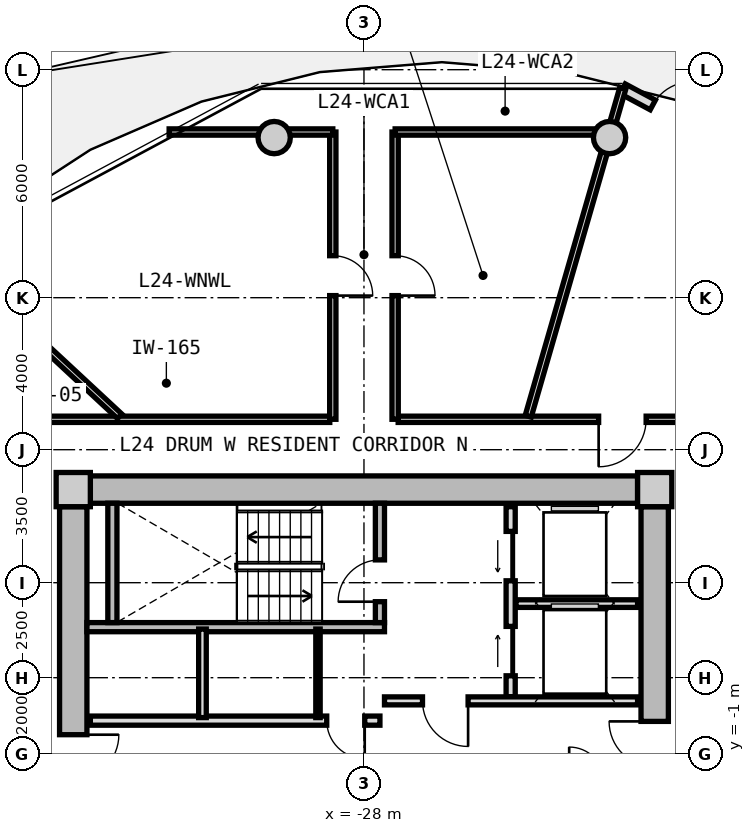
"""IFC4 building model, lengths in metres.
Left out: names, types, materials, properties, quantities, classifications, styles, units other than length and angle.
Written with IfcOpenShell. Run it as: python <this file> out.ifc"""

import sys

from ifc_helpers import new_model, si_unit, direction, frame, frame_2d, origin, origin_2d, place, context, subcontext, project, spatial, rectangle, circle, extrude, source, transform, mapped, element, fill, save


model = new_model("IFC4")
c1 = context("Model", 3, precision=1e-05, world=origin(), true_north=direction((0.0, 1.0)))
c2 = subcontext(c1, "Body", "Model", "MODEL_VIEW")
j1 = project(units=[si_unit("LENGTHUNIT", "METRE"), si_unit("PLANEANGLEUNIT", "RADIAN")], contexts=[c1])
p1 = place(None, origin())
s1 = spatial("IfcSite", under=j1, at=p1, CompositionType="ELEMENT")
p2 = place(p1, origin())
s2 = spatial("IfcBuilding", under=s1, at=p2, CompositionType="ELEMENT")
p3 = place(p2, frame((0.0, 0.0, 81.0)))
s3 = spatial("IfcBuildingStorey", under=s2, at=p3, CompositionType="ELEMENT", Elevation=81.0)
m1 = source(origin(), c2, "Body", "SweptSolid", [
    extrude(rectangle(XDim=0.9, YDim=0.9, at=origin_2d()), origin(), (0.0, 0.0, 1.0), 3.05),
])
for number, where, z_axis, x_axis in (
    (1, (-20.35, 5.95, 0.0), (0.0, 0.0, 1.0), (1.0, 0.0, 0.0)),
    (2, (-35.65, 5.95, 0.0), (0.0, 0.0, 1.0), (1.0, 0.0, 0.0)),
):
    element("IfcColumn", number, at=place(p3, frame(where, z_axis=z_axis, x_axis=x_axis)), inside=s3, PredefinedType="COLUMN", context=c2, shape_type="MappedRepresentation", body=[
        mapped(m1, transform((0.0, 0.0, 0.0), x_axis=(1.0, 0.0, 0.0), y_axis=(0.0, 1.0, 0.0), z_axis=(0.0, 0.0, 1.0), scale=1.0)),
    ])
m2 = source(origin(), c2, "Body", "SweptSolid", [
    extrude(rectangle(XDim=14.4, YDim=0.72, at=frame_2d((7.2, 0.0))), origin(), (0.0, 0.0, 1.0), 2.79),
])
p4 = place(p3, frame((-35.2, 5.95, 0.0), z_axis=(0.0, 0.0, 1.0), x_axis=(1.0, 0.0, 0.0)))
e3 = element("IfcWall", 3, at=p4, inside=s3, PredefinedType="SHEAR", context=c2, shape_type="MappedRepresentation", body=[
    mapped(m2, transform((0.0, 0.0, 0.0), x_axis=(1.0, 0.0, 0.0), y_axis=(0.0, 1.0, 0.0), z_axis=(0.0, 0.0, 1.0), scale=1.0)),
])
m3 = source(origin(), c2, "Body", "SweptSolid", [
    extrude(rectangle(XDim=11.0, YDim=0.72, at=frame_2d((5.5, 0.0))), origin(), (0.0, 0.0, 1.0), 2.79),
])
p5 = place(p3, frame((-35.65, -5.5, 0.0), z_axis=(0.0, 0.0, 1.0), x_axis=(0.0, 1.0, 0.0)))
e4 = element("IfcWall", 4, at=p5, inside=s3, PredefinedType="SHEAR", context=c2, shape_type="MappedRepresentation", body=[
    mapped(m3, transform((0.0, 0.0, 0.0), x_axis=(1.0, 0.0, 0.0), y_axis=(0.0, 1.0, 0.0), z_axis=(0.0, 0.0, 1.0), scale=1.0)),
])
p6 = place(p5, frame((3.8, 0.0, 0.0)))
e5 = element("IfcOpeningElement", 5, at=p6, cuts=e4, PredefinedType="OPENING", context=c2, shape_type="SweptSolid", body=[
    extrude(rectangle(XDim=1.2, YDim=2.15, at=frame_2d((0.6, 1.075))), frame((0.0, 0.37, 0.0), z_axis=(0.0, -1.0, 0.0), x_axis=(1.0, 0.0, 0.0)), (0.0, 0.0, 1.0), 0.74),
])
p7 = place(p3, frame((-20.35, 5.5, 0.0), z_axis=(0.0, 0.0, 1.0), x_axis=(0.0, -1.0, 0.0)))
e6 = element("IfcWall", 6, at=p7, inside=s3, PredefinedType="SHEAR", context=c2, shape_type="MappedRepresentation", body=[
    mapped(m3, transform((0.0, 0.0, 0.0), x_axis=(1.0, 0.0, 0.0), y_axis=(0.0, 1.0, 0.0), z_axis=(0.0, 0.0, 1.0), scale=1.0)),
])
p8 = place(p7, frame((5.65, 0.0, 0.0)))
e7 = element("IfcOpeningElement", 7, at=p8, cuts=e6, PredefinedType="OPENING", context=c2, shape_type="SweptSolid", body=[
    extrude(rectangle(XDim=1.2, YDim=2.15, at=frame_2d((0.6, 1.075))), frame((0.0, 0.37, 0.0), z_axis=(0.0, -1.0, 0.0), x_axis=(1.0, 0.0, 0.0)), (0.0, 0.0, 1.0), 0.74),
])
m4 = source(origin(), c2, "Body", "SweptSolid", [
    extrude(circle(Radius=0.425, at=origin_2d()), origin(), (0.0, 0.0, 1.0), 3.05),
])
for number, where, z_axis, x_axis in (
    (8, (-21.537, 15.213, 0.0), (0.0, 0.0, 1.0), (1.0, 0.0, 0.0)),
    (9, (-30.363, 15.213, 0.0), (0.0, 0.0, 1.0), (1.0, 0.0, 0.0)),
):
    element("IfcColumn", number, at=place(p3, frame(where, z_axis=z_axis, x_axis=x_axis)), inside=s3, PredefinedType="COLUMN", context=c2, shape_type="MappedRepresentation", body=[
        mapped(m4, transform((0.0, 0.0, 0.0), x_axis=(1.0, 0.0, 0.0), y_axis=(0.0, 1.0, 0.0), z_axis=(0.0, 0.0, 1.0), scale=1.0)),
    ])
m5 = source(origin(), c2, "Body", "SweptSolid", [
    extrude(rectangle(XDim=9.351, YDim=0.29, at=frame_2d((4.675, 0.0))), origin(), (0.0, 0.0, 1.0), 2.79),
])
p9 = place(p3, frame((-21.193, 16.498, 0.0), z_axis=(0.0, 0.0, 1.0), x_axis=(0.881184411073, -0.472772708267, 0.0)))
e10 = element("IfcWall", 10, at=p9, inside=s3, PredefinedType="SOLIDWALL", context=c2, shape_type="MappedRepresentation", body=[
    mapped(m5, transform((0.0, 0.0, 0.0), x_axis=(1.0, 0.0, 0.0), y_axis=(0.0, 1.0, 0.0), z_axis=(0.0, 0.0, 1.0), scale=1.0)),
])
p10 = place(p9, frame((0.9, 0.0, 0.0)))
e11 = element("IfcOpeningElement", 11, at=p10, cuts=e10, PredefinedType="OPENING", context=c2, shape_type="SweptSolid", body=[
    extrude(rectangle(XDim=1.15, YDim=2.25, at=frame_2d((0.575, 1.125))), frame((0.0, 0.155, 0.0), z_axis=(0.0, -1.0, 0.0), x_axis=(1.0, 0.0, 0.0)), (0.0, 0.0, 1.0), 0.31),
])
p11 = place(p9, frame((5.025, 0.0, 0.85)))
e12 = element("IfcOpeningElement", 12, at=p11, cuts=e10, PredefinedType="OPENING", context=c2, shape_type="SweptSolid", body=[
    extrude(rectangle(XDim=1.2, YDim=1.5, at=frame_2d((0.6, 0.75))), frame((0.0, 0.155, 0.0), z_axis=(0.0, -1.0, 0.0), x_axis=(1.0, 0.0, 0.0)), (0.0, 0.0, 1.0), 0.31),
])
m6 = source(origin(), c2, "Body", "SweptSolid", [
    extrude(rectangle(XDim=7.83, YDim=0.24, at=frame_2d((3.915, 0.0))), origin(), (0.0, 0.0, 1.0), 2.79),
])
p12 = place(p3, frame((-35.29, 2.33, 0.0), z_axis=(0.0, 0.0, 1.0), x_axis=(1.0, 0.0, 0.0)))
e13 = element("IfcWall", 13, at=p12, inside=s3, PredefinedType="PARTITIONING", context=c2, shape_type="MappedRepresentation", body=[
    mapped(m6, transform((0.0, 0.0, 0.0), x_axis=(1.0, 0.0, 0.0), y_axis=(0.0, 1.0, 0.0), z_axis=(0.0, 0.0, 1.0), scale=1.0)),
])
m7 = source(origin(), c2, "Body", "SweptSolid", [
    extrude(rectangle(XDim=3.14, YDim=0.24, at=frame_2d((1.57, 0.0))), origin(), (0.0, 0.0, 1.0), 2.79),
])
p13 = place(p3, frame((-34.62, 2.45, 0.0), z_axis=(0.0, 0.0, 1.0), x_axis=(0.0, 1.0, 0.0)))
e14 = element("IfcWall", 14, at=p13, inside=s3, PredefinedType="PARTITIONING", context=c2, shape_type="MappedRepresentation", body=[
    mapped(m7, transform((0.0, 0.0, 0.0), x_axis=(1.0, 0.0, 0.0), y_axis=(0.0, 1.0, 0.0), z_axis=(0.0, 0.0, 1.0), scale=1.0)),
])
p14 = place(p3, frame((-27.58, 2.45, 0.0), z_axis=(0.0, 0.0, 1.0), x_axis=(0.0, 1.0, 0.0)))
e15 = element("IfcWall", 15, at=p14, inside=s3, PredefinedType="PARTITIONING", context=c2, shape_type="MappedRepresentation", body=[
    mapped(m7, transform((0.0, 0.0, 0.0), x_axis=(1.0, 0.0, 0.0), y_axis=(0.0, 1.0, 0.0), z_axis=(0.0, 0.0, 1.0), scale=1.0)),
])
p15 = place(p14, frame((0.55, 0.0, 0.0)))
e16 = element("IfcOpeningElement", 16, at=p15, cuts=e15, PredefinedType="OPENING", context=c2, shape_type="SweptSolid", body=[
    extrude(rectangle(XDim=1.1, YDim=2.15, at=frame_2d((0.55, 1.075))), frame((0.0, 0.13, 0.0), z_axis=(0.0, -1.0, 0.0), x_axis=(1.0, 0.0, 0.0)), (0.0, 0.0, 1.0), 0.26),
])
m8 = source(origin(), c2, "Body", "SweptSolid", [
    extrude(rectangle(XDim=5.0, YDim=0.24, at=frame_2d((2.5, 0.0))), origin(), (0.0, 0.0, 1.0), 2.775),
])
p16 = place(p3, frame((-24.14, 0.5, 0.0), z_axis=(0.0, 0.0, 1.0), x_axis=(0.0, 1.0, 0.0)))
e17 = element("IfcWall", 17, at=p16, inside=s3, PredefinedType="PARTITIONING", context=c2, shape_type="MappedRepresentation", body=[
    mapped(m8, transform((0.0, 0.0, 0.0), x_axis=(1.0, 0.0, 0.0), y_axis=(0.0, 1.0, 0.0), z_axis=(0.0, 0.0, 1.0), scale=1.0)),
])
p17 = place(p16, frame((3.05, 0.0, 0.0)))
e18 = element("IfcOpeningElement", 18, at=p17, cuts=e17, PredefinedType="OPENING", context=c2, shape_type="SweptSolid", body=[
    extrude(rectangle(XDim=1.3, YDim=2.2, at=frame_2d((0.65, 1.1))), frame((0.0, 0.13, 0.0), z_axis=(0.0, -1.0, 0.0), x_axis=(1.0, 0.0, 0.0)), (0.0, 0.0, 1.0), 0.26),
])
p18 = place(p16, frame((0.55, 0.0, 0.0)))
e19 = element("IfcOpeningElement", 19, at=p18, cuts=e17, PredefinedType="OPENING", context=c2, shape_type="SweptSolid", body=[
    extrude(rectangle(XDim=1.3, YDim=2.2, at=frame_2d((0.65, 1.1))), frame((0.0, 0.13, 0.0), z_axis=(0.0, -1.0, 0.0), x_axis=(1.0, 0.0, 0.0)), (0.0, 0.0, 1.0), 0.26),
])
m9 = source(origin(), c2, "Body", "SweptSolid", [
    extrude(rectangle(XDim=3.2, YDim=0.2, at=frame_2d((1.6, 0.0))), origin(), (0.0, 0.0, 1.0), 2.775),
])
p19 = place(p3, frame((-24.0, 2.95, 0.0), z_axis=(0.0, 0.0, 1.0), x_axis=(1.0, 0.0, 0.0)))
e20 = element("IfcWall", 20, at=p19, inside=s3, PredefinedType="PARTITIONING", context=c2, shape_type="MappedRepresentation", body=[
    mapped(m9, transform((0.0, 0.0, 0.0), x_axis=(1.0, 0.0, 0.0), y_axis=(0.0, 1.0, 0.0), z_axis=(0.0, 0.0, 1.0), scale=1.0)),
])
m10 = source(origin(), c2, "Body", "SweptSolid", [
    extrude(rectangle(XDim=6.66, YDim=0.21, at=frame_2d((3.33, 0.0))), origin(), (0.0, 0.0, 1.0), 2.775),
])
p20 = place(p3, frame((-27.46, 0.39, 0.0), z_axis=(0.0, 0.0, 1.0), x_axis=(1.0, 0.0, 0.0)))
e21 = element("IfcWall", 21, at=p20, inside=s3, PredefinedType="PARTITIONING", context=c2, shape_type="MappedRepresentation", body=[
    mapped(m10, transform((0.0, 0.0, 0.0), x_axis=(1.0, 0.0, 0.0), y_axis=(0.0, 1.0, 0.0), z_axis=(0.0, 0.0, 1.0), scale=1.0)),
])
p21 = place(p20, frame((1.0, 0.0, 0.0)))
e22 = element("IfcOpeningElement", 22, at=p21, cuts=e21, PredefinedType="OPENING", context=c2, shape_type="SweptSolid", body=[
    extrude(rectangle(XDim=1.2, YDim=2.15, at=frame_2d((0.6, 1.075))), frame((0.0, 0.115, 0.0), z_axis=(0.0, -1.0, 0.0), x_axis=(1.0, 0.0, 0.0)), (0.0, 0.0, 1.0), 0.23),
])
m11 = source(origin(), c2, "Body", "SweptSolid", [
    extrude(rectangle(XDim=7.62, YDim=0.24, at=frame_2d((3.81, 0.0))), origin(), (0.0, 0.0, 1.0), 2.775),
])
p22 = place(p3, frame((-35.2, -0.13, 0.0), z_axis=(0.0, 0.0, 1.0), x_axis=(1.0, 0.0, 0.0)))
e23 = element("IfcWall", 23, at=p22, inside=s3, PredefinedType="PARTITIONING", context=c2, shape_type="MappedRepresentation", body=[
    mapped(m11, transform((0.0, 0.0, 0.0), x_axis=(1.0, 0.0, 0.0), y_axis=(0.0, 1.0, 0.0), z_axis=(0.0, 0.0, 1.0), scale=1.0)),
])
p23 = place(p22, frame((6.22, 0.0, 0.0)))
e24 = element("IfcOpeningElement", 24, at=p23, cuts=e23, PredefinedType="OPENING", context=c2, shape_type="SweptSolid", body=[
    extrude(rectangle(XDim=1.0, YDim=2.1, at=frame_2d((0.5, 1.05))), frame((0.0, 0.13, 0.0), z_axis=(0.0, -1.0, 0.0), x_axis=(1.0, 0.0, 0.0)), (0.0, 0.0, 1.0), 0.26),
])
m12 = source(origin(), c2, "Body", "SweptSolid", [
    extrude(rectangle(XDim=2.33, YDim=0.115, at=frame_2d((1.165, 0.0))), origin(), (0.0, 0.0, 1.0), 2.775),
])
p24 = place(p3, frame((-29.21, -0.05, 0.0), z_axis=(0.0, 0.0, 1.0), x_axis=(0.0, 1.0, 0.0)))
e25 = element("IfcWall", 25, at=p24, inside=s3, PredefinedType="PARTITIONING", context=c2, shape_type="MappedRepresentation", body=[
    mapped(m12, transform((0.0, 0.0, 0.0), x_axis=(1.0, 0.0, 0.0), y_axis=(0.0, 1.0, 0.0), z_axis=(0.0, 0.0, 1.0), scale=1.0)),
])
m13 = source(origin(), c2, "Body", "SweptSolid", [
    extrude(rectangle(XDim=2.33, YDim=0.2, at=frame_2d((1.165, 0.0))), origin(), (0.0, 0.0, 1.0), 2.775),
])
p25 = place(p3, frame((-32.25, -0.05, 0.0), z_axis=(0.0, 0.0, 1.0), x_axis=(0.0, 1.0, 0.0)))
e26 = element("IfcWall", 26, at=p25, inside=s3, PredefinedType="PARTITIONING", context=c2, shape_type="MappedRepresentation", body=[
    mapped(m13, transform((0.0, 0.0, 0.0), x_axis=(1.0, 0.0, 0.0), y_axis=(0.0, 1.0, 0.0), z_axis=(0.0, 0.0, 1.0), scale=1.0)),
])
m14 = source(origin(), c2, "Body", "SweptSolid", [
    extrude(rectangle(XDim=8.6, YDim=0.165, at=frame_2d((4.3, 0.0))), origin(), (0.0, 0.0, 1.0), 2.775),
])
p26 = place(p3, frame((-37.5, 7.8, 0.0), z_axis=(0.0, 0.0, 1.0), x_axis=(1.0, 0.0, 0.0)))
e27 = element("IfcWall", 27, at=p26, inside=s3, PredefinedType="PARTITIONING", context=c2, shape_type="MappedRepresentation", body=[
    mapped(m14, transform((0.0, 0.0, 0.0), x_axis=(1.0, 0.0, 0.0), y_axis=(0.0, 1.0, 0.0), z_axis=(0.0, 0.0, 1.0), scale=1.0)),
])
p27 = place(p3, frame((-27.1, 7.8, 0.0), z_axis=(0.0, 0.0, 1.0), x_axis=(1.0, 0.0, 0.0)))
e28 = element("IfcWall", 28, at=p27, inside=s3, PredefinedType="PARTITIONING", context=c2, shape_type="MappedRepresentation", body=[
    mapped(m14, transform((0.0, 0.0, 0.0), x_axis=(1.0, 0.0, 0.0), y_axis=(0.0, 1.0, 0.0), z_axis=(0.0, 0.0, 1.0), scale=1.0)),
])
p28 = place(p27, frame((5.275, 0.0, 0.0)))
e29 = element("IfcOpeningElement", 29, at=p28, cuts=e28, PredefinedType="OPENING", context=c2, shape_type="SweptSolid", body=[
    extrude(rectangle(XDim=1.25, YDim=2.2, at=frame_2d((0.625, 1.1))), frame((0.0, 0.093, 0.0), z_axis=(0.0, -1.0, 0.0), x_axis=(1.0, 0.0, 0.0)), (0.0, 0.0, 1.0), 0.185),
])
m15 = source(origin(), c2, "Body", "SweptSolid", [
    extrude(rectangle(XDim=8.989, YDim=0.165, at=frame_2d((4.495, 0.0))), origin(), (0.0, 0.0, 1.0), 2.415),
])
p29 = place(p3, frame((-23.678, 7.88, 0.0), z_axis=(0.0, 0.0, 1.0), x_axis=(0.27702323008, 0.960863221274, 0.0)))
e30 = element("IfcWall", 30, at=p29, inside=s3, PredefinedType="PARTITIONING", context=c2, shape_type="MappedRepresentation", body=[
    mapped(m15, transform((0.0, 0.0, 0.0), x_axis=(1.0, 0.0, 0.0), y_axis=(0.0, 1.0, 0.0), z_axis=(0.0, 0.0, 1.0), scale=1.0)),
])
m16 = source(origin(), c2, "Body", "SweptSolid", [
    extrude(rectangle(XDim=6.187, YDim=0.165, at=frame_2d((3.093, 0.0))), origin(), (0.0, 0.0, 1.0), 2.275),
])
p30 = place(p3, frame((-34.429, 7.88, 0.0), z_axis=(0.0, 0.0, 1.0), x_axis=(-0.732501077882, 0.680765870841, 0.0)))
e31 = element("IfcWall", 31, at=p30, inside=s3, PredefinedType="PARTITIONING", context=c2, shape_type="MappedRepresentation", body=[
    mapped(m16, transform((0.0, 0.0, 0.0), x_axis=(1.0, 0.0, 0.0), y_axis=(0.0, 1.0, 0.0), z_axis=(0.0, 0.0, 1.0), scale=1.0)),
])
m17 = source(origin(), c2, "Body", "SweptSolid", [
    extrude(rectangle(XDim=7.56, YDim=0.165, at=frame_2d((3.78, 0.0))), origin(), (0.0, 0.0, 1.0), 2.775),
])
p31 = place(p3, frame((-28.82, 7.8, 0.0), z_axis=(0.0, 0.0, 1.0), x_axis=(0.0, 1.0, 0.0)))
e32 = element("IfcWall", 32, at=p31, inside=s3, PredefinedType="PARTITIONING", context=c2, shape_type="MappedRepresentation", body=[
    mapped(m17, transform((0.0, 0.0, 0.0), x_axis=(1.0, 0.0, 0.0), y_axis=(0.0, 1.0, 0.0), z_axis=(0.0, 0.0, 1.0), scale=1.0)),
])
p32 = place(p31, frame((3.255, 0.0, 0.0)))
e33 = element("IfcOpeningElement", 33, at=p32, cuts=e32, PredefinedType="OPENING", context=c2, shape_type="SweptSolid", body=[
    extrude(rectangle(XDim=1.05, YDim=2.15, at=frame_2d((0.525, 1.075))), frame((0.0, 0.093, 0.0), z_axis=(0.0, -1.0, 0.0), x_axis=(1.0, 0.0, 0.0)), (0.0, 0.0, 1.0), 0.185),
])
m18 = source(origin(), c2, "Body", "SweptSolid", [
    extrude(rectangle(XDim=4.307, YDim=0.165, at=frame_2d((2.153, 0.0))), origin(), (0.0, 0.0, 1.0), 2.275),
])
p33 = place(p3, frame((-33.127, 15.36, 0.0), z_axis=(0.0, 0.0, 1.0), x_axis=(1.0, 0.0, 0.0)))
e34 = element("IfcWall", 34, at=p33, inside=s3, PredefinedType="PARTITIONING", context=c2, shape_type="MappedRepresentation", body=[
    mapped(m18, transform((0.0, 0.0, 0.0), x_axis=(1.0, 0.0, 0.0), y_axis=(0.0, 1.0, 0.0), z_axis=(0.0, 0.0, 1.0), scale=1.0)),
])
p34 = place(p3, frame((-27.18, 7.8, 0.0), z_axis=(0.0, 0.0, 1.0), x_axis=(0.0, 1.0, 0.0)))
e35 = element("IfcWall", 35, at=p34, inside=s3, PredefinedType="PARTITIONING", context=c2, shape_type="MappedRepresentation", body=[
    mapped(m17, transform((0.0, 0.0, 0.0), x_axis=(1.0, 0.0, 0.0), y_axis=(0.0, 1.0, 0.0), z_axis=(0.0, 0.0, 1.0), scale=1.0)),
])
p35 = place(p34, frame((3.255, 0.0, 0.0)))
e36 = element("IfcOpeningElement", 36, at=p35, cuts=e35, PredefinedType="OPENING", context=c2, shape_type="SweptSolid", body=[
    extrude(rectangle(XDim=1.05, YDim=2.15, at=frame_2d((0.525, 1.075))), frame((0.0, 0.093, 0.0), z_axis=(0.0, -1.0, 0.0), x_axis=(1.0, 0.0, 0.0)), (0.0, 0.0, 1.0), 0.185),
])
m19 = source(origin(), c2, "Body", "SweptSolid", [
    extrude(rectangle(XDim=5.814, YDim=0.165, at=frame_2d((2.907, 0.0))), origin(), (0.0, 0.0, 1.0), 2.275),
])
p36 = place(p3, frame((-27.18, 15.36, 0.0), z_axis=(0.0, 0.0, 1.0), x_axis=(1.0, 0.0, 0.0)))
e37 = element("IfcWall", 37, at=p36, inside=s3, PredefinedType="PARTITIONING", context=c2, shape_type="MappedRepresentation", body=[
    mapped(m19, transform((0.0, 0.0, 0.0), x_axis=(1.0, 0.0, 0.0), y_axis=(0.0, 1.0, 0.0), z_axis=(0.0, 0.0, 1.0), scale=1.0)),
])
m20 = source(origin(), c2, "Body", "SweptSolid", [
    extrude(rectangle(XDim=1.15, YDim=2.25, at=frame_2d((0.575, 1.125))), frame((0.0, 0.025, 0.0), z_axis=(0.0, -1.0, 0.0), x_axis=(1.0, 0.0, 0.0)), (0.0, 0.0, 1.0), 0.05),
])
p37 = place(p10, origin())
e38 = element("IfcDoor", 38, at=p37, inside=s3, OperationType="SINGLE_SWING_RIGHT", PredefinedType="DOOR", context=c2, shape_type="MappedRepresentation", body=[
    mapped(m20, transform((0.0, 0.0, 0.0), x_axis=(1.0, 0.0, 0.0), y_axis=(0.0, 1.0, 0.0), z_axis=(0.0, 0.0, 1.0), scale=1.0)),
])
fill(e11, e38)
m21 = source(origin(), c2, "Body", "SweptSolid", [
    extrude(rectangle(XDim=1.1, YDim=2.15, at=frame_2d((0.55, 1.075))), frame((0.0, 0.025, 0.0), z_axis=(0.0, -1.0, 0.0), x_axis=(1.0, 0.0, 0.0)), (0.0, 0.0, 1.0), 0.05),
])
p38 = place(p15, origin())
e39 = element("IfcDoor", 39, at=p38, inside=s3, OperationType="SINGLE_SWING_LEFT", PredefinedType="DOOR", context=c2, shape_type="MappedRepresentation", body=[
    mapped(m21, transform((0.0, 0.0, 0.0), x_axis=(1.0, 0.0, 0.0), y_axis=(0.0, 1.0, 0.0), z_axis=(0.0, 0.0, 1.0), scale=1.0)),
])
fill(e16, e39)
m22 = source(origin(), c2, "Body", "SweptSolid", [
    extrude(rectangle(XDim=1.3, YDim=2.2, at=frame_2d((0.65, 1.1))), frame((0.0, 0.025, 0.0), z_axis=(0.0, -1.0, 0.0), x_axis=(1.0, 0.0, 0.0)), (0.0, 0.0, 1.0), 0.05),
])
p39 = place(p17, origin())
e40 = element("IfcDoor", 40, at=p39, inside=s3, OperationType="SLIDING_TO_LEFT", PredefinedType="DOOR", context=c2, shape_type="MappedRepresentation", body=[
    mapped(m22, transform((0.0, 0.0, 0.0), x_axis=(1.0, 0.0, 0.0), y_axis=(0.0, 1.0, 0.0), z_axis=(0.0, 0.0, 1.0), scale=1.0)),
])
fill(e18, e40)
p40 = place(p18, origin())
e41 = element("IfcDoor", 41, at=p40, inside=s3, OperationType="SLIDING_TO_RIGHT", PredefinedType="DOOR", context=c2, shape_type="MappedRepresentation", body=[
    mapped(m22, transform((0.0, 0.0, 0.0), x_axis=(1.0, 0.0, 0.0), y_axis=(0.0, 1.0, 0.0), z_axis=(0.0, 0.0, 1.0), scale=1.0)),
])
fill(e19, e41)
m23 = source(origin(), c2, "Body", "SweptSolid", [
    extrude(rectangle(XDim=1.2, YDim=2.15, at=frame_2d((0.6, 1.075))), frame((0.0, 0.025, 0.0), z_axis=(0.0, -1.0, 0.0), x_axis=(1.0, 0.0, 0.0)), (0.0, 0.0, 1.0), 0.05),
])
p41 = place(p21, frame((1.2, 0.0, 0.0), z_axis=(0.0, 0.0, 1.0), x_axis=(-1.0, 0.0, 0.0)))
e42 = element("IfcDoor", 42, at=p41, inside=s3, OperationType="SINGLE_SWING_LEFT", PredefinedType="DOOR", context=c2, shape_type="MappedRepresentation", body=[
    mapped(m23, transform((0.0, 0.0, 0.0), x_axis=(1.0, 0.0, 0.0), y_axis=(0.0, 1.0, 0.0), z_axis=(0.0, 0.0, 1.0), scale=1.0)),
])
fill(e22, e42)
p42 = place(p6, frame((1.2, 0.0, 0.0), z_axis=(0.0, 0.0, 1.0), x_axis=(-1.0, 0.0, 0.0)))
e43 = element("IfcDoor", 43, at=p42, inside=s3, OperationType="SINGLE_SWING_LEFT", PredefinedType="DOOR", context=c2, shape_type="MappedRepresentation", body=[
    mapped(m23, transform((0.0, 0.0, 0.0), x_axis=(1.0, 0.0, 0.0), y_axis=(0.0, 1.0, 0.0), z_axis=(0.0, 0.0, 1.0), scale=1.0)),
])
fill(e5, e43)
p43 = place(p8, frame((1.2, 0.0, 0.0), z_axis=(0.0, 0.0, 1.0), x_axis=(-1.0, 0.0, 0.0)))
e44 = element("IfcDoor", 44, at=p43, inside=s3, OperationType="SINGLE_SWING_RIGHT", PredefinedType="DOOR", context=c2, shape_type="MappedRepresentation", body=[
    mapped(m23, transform((0.0, 0.0, 0.0), x_axis=(1.0, 0.0, 0.0), y_axis=(0.0, 1.0, 0.0), z_axis=(0.0, 0.0, 1.0), scale=1.0)),
])
fill(e7, e44)
m24 = source(origin(), c2, "Body", "SweptSolid", [
    extrude(rectangle(XDim=1.0, YDim=2.1, at=frame_2d((0.5, 1.05))), frame((0.0, 0.025, 0.0), z_axis=(0.0, -1.0, 0.0), x_axis=(1.0, 0.0, 0.0)), (0.0, 0.0, 1.0), 0.05),
])
p44 = place(p23, frame((1.0, 0.0, 0.0), z_axis=(0.0, 0.0, 1.0), x_axis=(-1.0, 0.0, 0.0)))
e45 = element("IfcDoor", 45, at=p44, inside=s3, OperationType="SINGLE_SWING_LEFT", PredefinedType="DOOR", context=c2, shape_type="MappedRepresentation", body=[
    mapped(m24, transform((0.0, 0.0, 0.0), x_axis=(1.0, 0.0, 0.0), y_axis=(0.0, 1.0, 0.0), z_axis=(0.0, 0.0, 1.0), scale=1.0)),
])
fill(e24, e45)
m25 = source(origin(), c2, "Body", "SweptSolid", [
    extrude(rectangle(XDim=1.05, YDim=2.15, at=frame_2d((0.525, 1.075))), frame((0.0, 0.025, 0.0), z_axis=(0.0, -1.0, 0.0), x_axis=(1.0, 0.0, 0.0)), (0.0, 0.0, 1.0), 0.05),
])
p45 = place(p32, frame((1.05, 0.0, 0.0), z_axis=(0.0, 0.0, 1.0), x_axis=(-1.0, 0.0, 0.0)))
e46 = element("IfcDoor", 46, at=p45, inside=s3, OperationType="SINGLE_SWING_RIGHT", PredefinedType="DOOR", context=c2, shape_type="MappedRepresentation", body=[
    mapped(m25, transform((0.0, 0.0, 0.0), x_axis=(1.0, 0.0, 0.0), y_axis=(0.0, 1.0, 0.0), z_axis=(0.0, 0.0, 1.0), scale=1.0)),
])
fill(e33, e46)
p46 = place(p35, frame((1.05, 0.0, 0.0), z_axis=(0.0, 0.0, 1.0), x_axis=(-1.0, 0.0, 0.0)))
e47 = element("IfcDoor", 47, at=p46, inside=s3, OperationType="SINGLE_SWING_RIGHT", PredefinedType="DOOR", context=c2, shape_type="MappedRepresentation", body=[
    mapped(m25, transform((0.0, 0.0, 0.0), x_axis=(1.0, 0.0, 0.0), y_axis=(0.0, 1.0, 0.0), z_axis=(0.0, 0.0, 1.0), scale=1.0)),
])
fill(e36, e47)
m26 = source(origin(), c2, "Body", "SweptSolid", [
    extrude(rectangle(XDim=1.25, YDim=2.2, at=frame_2d((0.625, 1.1))), frame((0.0, 0.025, 0.0), z_axis=(0.0, -1.0, 0.0), x_axis=(1.0, 0.0, 0.0)), (0.0, 0.0, 1.0), 0.05),
])
p47 = place(p28, frame((1.25, 0.0, 0.0), z_axis=(0.0, 0.0, 1.0), x_axis=(-1.0, 0.0, 0.0)))
e48 = element("IfcDoor", 48, at=p47, inside=s3, OperationType="SINGLE_SWING_RIGHT", PredefinedType="DOOR", context=c2, shape_type="MappedRepresentation", body=[
    mapped(m26, transform((0.0, 0.0, 0.0), x_axis=(1.0, 0.0, 0.0), y_axis=(0.0, 1.0, 0.0), z_axis=(0.0, 0.0, 1.0), scale=1.0)),
])
fill(e29, e48)
save(model, sys.argv[1])
